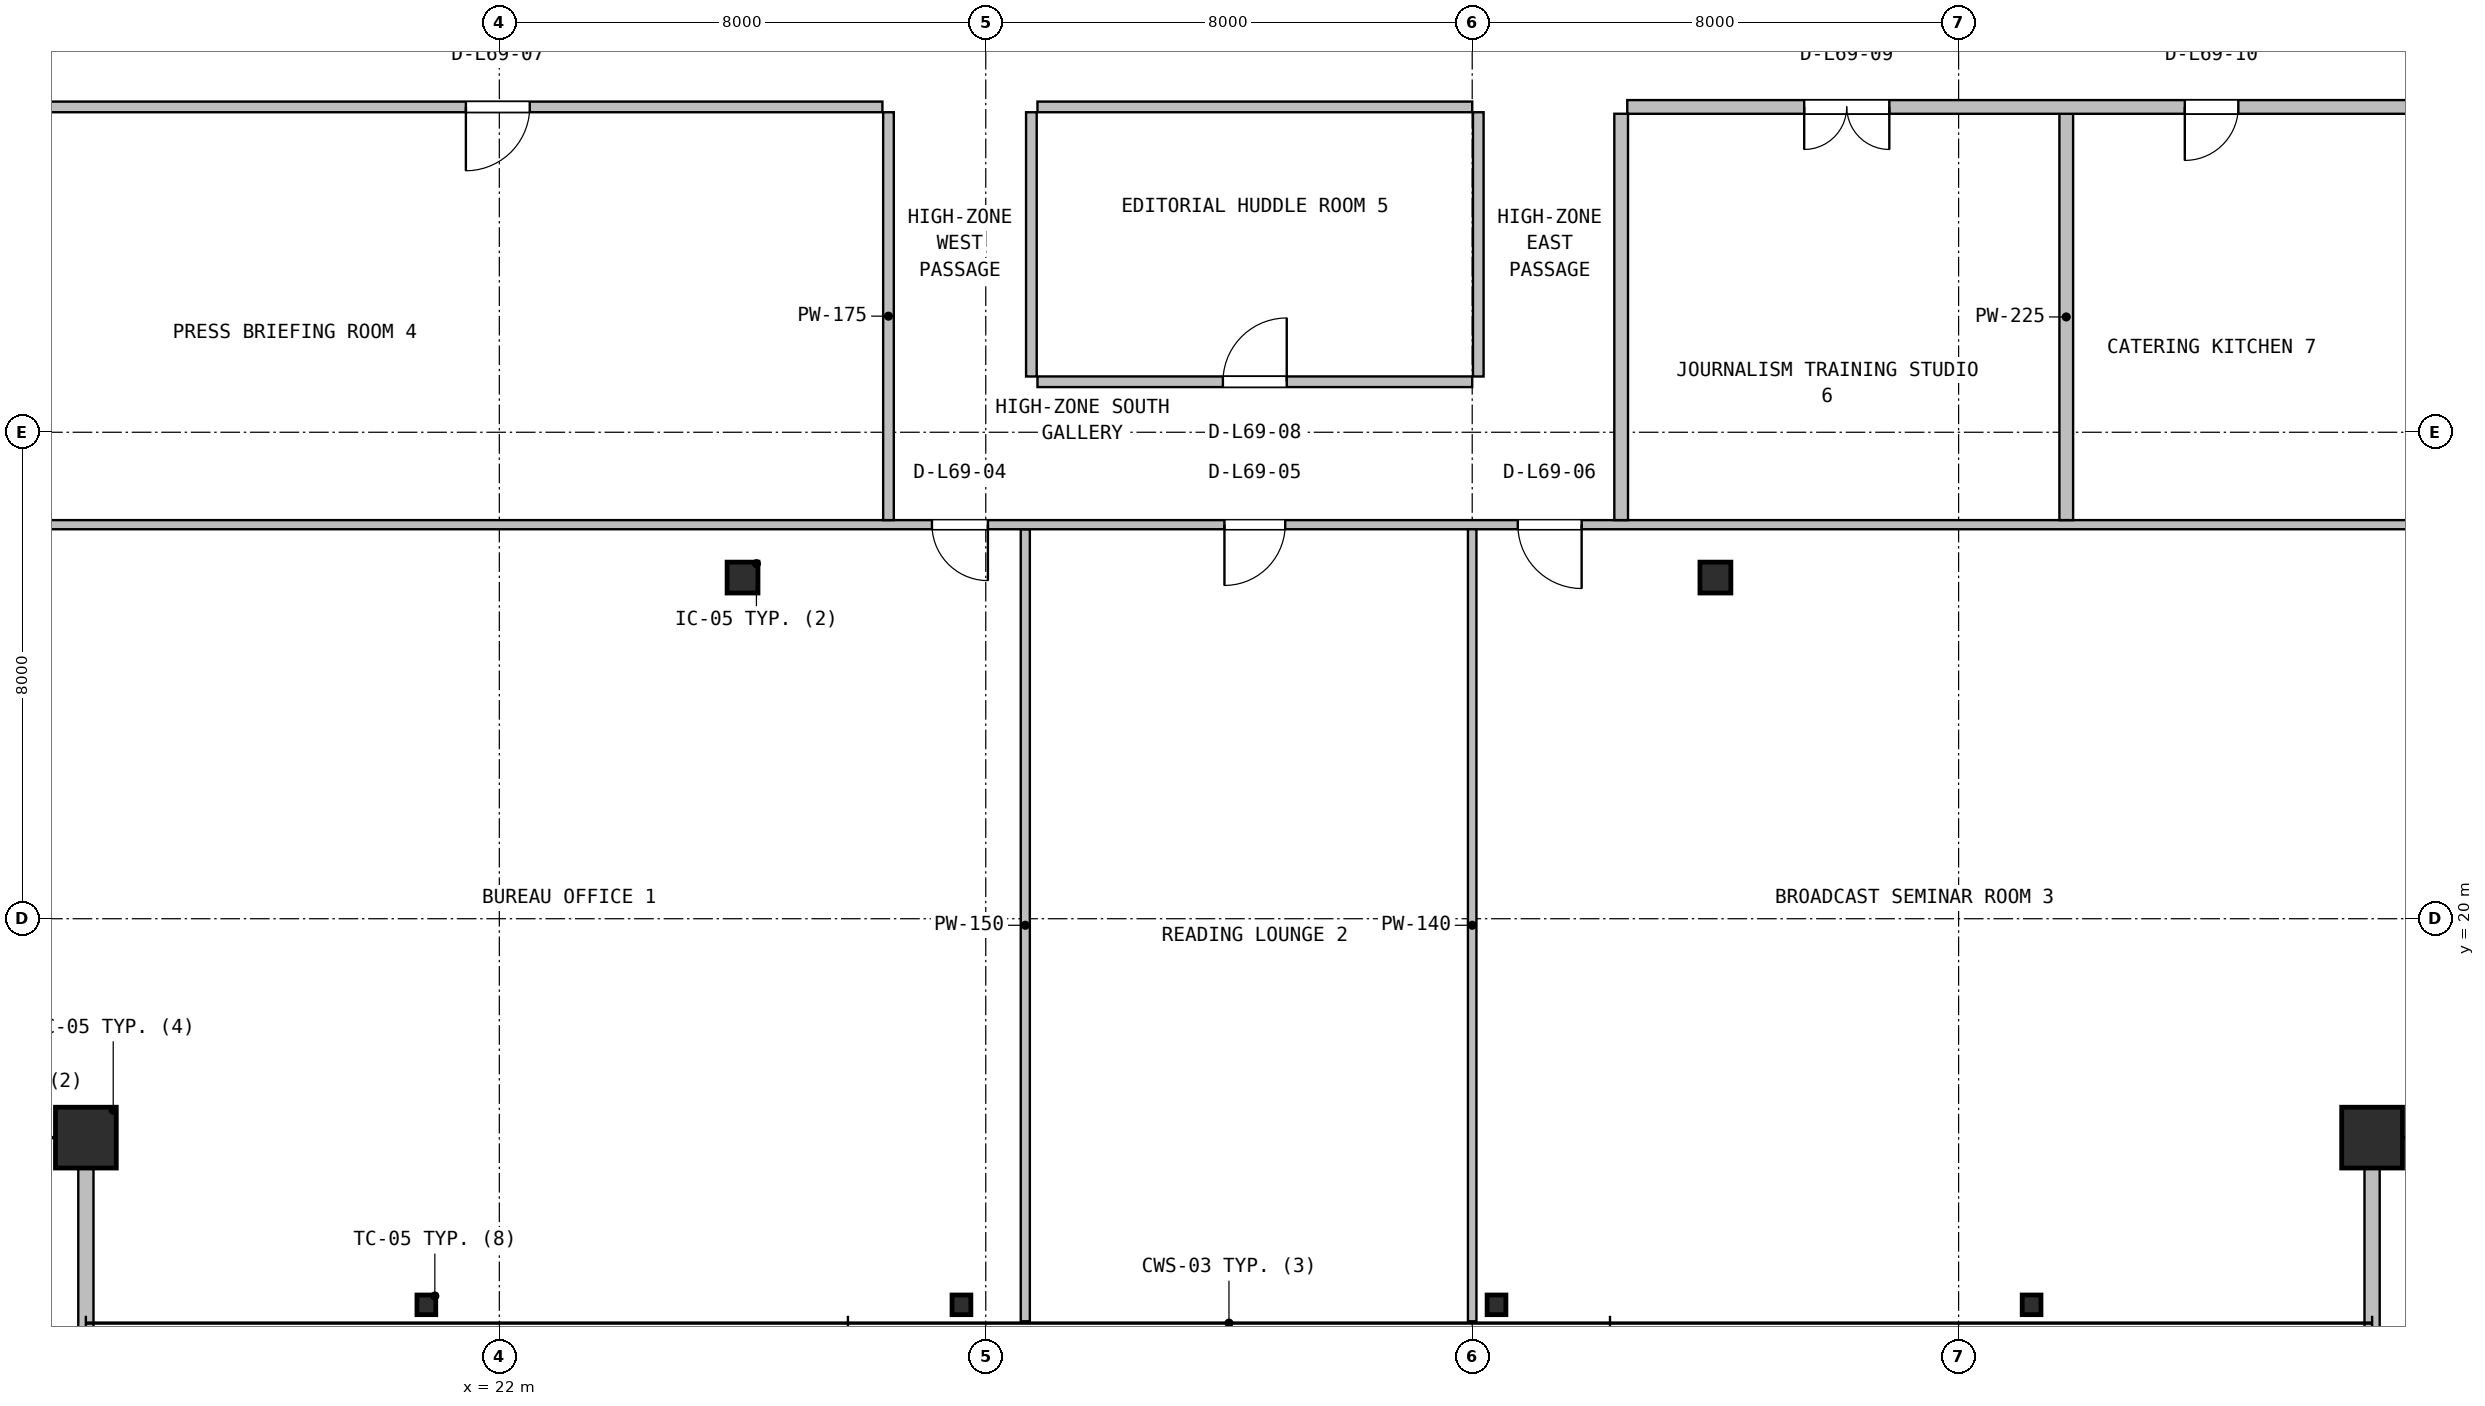
"""IFC4 building model, lengths in metres.
Left out: names, types, materials, properties, quantities, classifications, styles, units other than length and angle.
Written with IfcOpenShell. Run it as: python <this file> out.ifc"""

import sys

from ifc_helpers import new_model, si_unit, direction, frame, frame_2d, origin, origin_2d, place, context, subcontext, project, spatial, rectangle, hollow_rectangle, hollow_circle, i_section, extrude, source, transform, mapped, element, fill, save


model = new_model("IFC4")
c1 = context("Model", 3, precision=1e-05, world=origin(), true_north=direction((0.0, 1.0)))
c2 = subcontext(c1, "Body", "Model", "MODEL_VIEW")
j1 = project(units=[si_unit("LENGTHUNIT", "METRE"), si_unit("PLANEANGLEUNIT", "RADIAN")], contexts=[c1])
p1 = place(None, origin())
s1 = spatial("IfcSite", under=j1, at=p1, CompositionType="ELEMENT")
p2 = place(p1, origin())
s2 = spatial("IfcBuilding", under=s1, at=p2, CompositionType="ELEMENT")
p3 = place(p2, frame((0.0, 0.0, 277.4)))
s3 = spatial("IfcBuildingStorey", under=s2, at=p3, CompositionType="ELEMENT", Elevation=277.4)
m1 = source(origin(), c2, "Body", "SweptSolid", [
    extrude(hollow_rectangle(XDim=1.0, YDim=1.0, WallThickness=0.04, at=origin_2d()), origin(), (0.0, 0.0, 1.0), 3.8),
])
for number, where, z_axis, x_axis in (
    (1, (15.2, 16.4, 0.0), (0.0, 0.0, 1.0), (1.0, 0.0, 0.0)),
    (2, (52.8, 16.4, 0.0), (0.0, 0.0, 1.0), (1.0, 0.0, 0.0)),
):
    element("IfcColumn", number, at=place(p3, frame(where, z_axis=z_axis, x_axis=x_axis)), inside=s3, PredefinedType="COLUMN", context=c2, shape_type="MappedRepresentation", body=[
        mapped(m1, transform((0.0, 0.0, 0.0), x_axis=(1.0, 0.0, 0.0), y_axis=(0.0, 1.0, 0.0), z_axis=(0.0, 0.0, 1.0), scale=1.0)),
    ])
m2 = source(origin(), c2, "Body", "SweptSolid", [
    extrude(i_section(OverallWidth=0.309, OverallDepth=0.323, WebThickness=0.014, FlangeThickness=0.023, FilletRadius=0.015, at=origin_2d()), origin(), (0.0, 0.0, 1.0), 3.8),
])
for number, where, z_axis, x_axis in (
    (3, (20.8, 13.65, 0.0), (0.0, 0.0, 1.0), (1.0, 0.0, 0.0)),
    (4, (29.6, 13.65, 0.0), (0.0, 0.0, 1.0), (1.0, 0.0, 0.0)),
    (5, (38.4, 13.65, 0.0), (0.0, 0.0, 1.0), (1.0, 0.0, 0.0)),
    (6, (47.2, 13.65, 0.0), (0.0, 0.0, 1.0), (1.0, 0.0, 0.0)),
):
    element("IfcColumn", number, at=place(p3, frame(where, z_axis=z_axis, x_axis=x_axis)), inside=s3, PredefinedType="COLUMN", context=c2, shape_type="MappedRepresentation", body=[
        mapped(m2, transform((0.0, 0.0, 0.0), x_axis=(1.0, 0.0, 0.0), y_axis=(0.0, 1.0, 0.0), z_axis=(0.0, 0.0, 1.0), scale=1.0)),
    ])
m3 = source(origin(), c2, "Body", "SweptSolid", [
    extrude(hollow_circle(Radius=0.254, WallThickness=0.02, at=origin_2d()), origin(), (0.0, 0.0, 1.0), 3.8),
])
for number, where, z_axis, x_axis in (
    (7, (26.0, 25.61, 0.0), (0.0, 0.0, 1.0), (1.0, 0.0, 0.0)),
    (8, (42.0, 25.61, 0.0), (0.0, 0.0, 1.0), (1.0, 0.0, 0.0)),
):
    element("IfcColumn", number, at=place(p3, frame(where, z_axis=z_axis, x_axis=x_axis)), inside=s3, PredefinedType="COLUMN", context=c2, shape_type="MappedRepresentation", body=[
        mapped(m3, transform((0.0, 0.0, 0.0), x_axis=(1.0, 0.0, 0.0), y_axis=(0.0, 1.0, 0.0), z_axis=(0.0, 0.0, 1.0), scale=1.0)),
    ])
for number, where, z_axis, x_axis in (
    (9, (15.2, 13.28, 0.0), (0.0, 0.0, 1.0), (0.0, 1.0, 0.0)),
    (10, (52.8, 13.28, 0.0), (0.0, 0.0, 1.0), (0.0, 1.0, 0.0)),
):
    element("IfcWall", number, at=place(p3, frame(where, z_axis=z_axis, x_axis=x_axis)), inside=s3, PredefinedType="SOLIDWALL", context=c2, shape_type="SweptSolid", body=[
        extrude(rectangle(XDim=3.2, YDim=0.25, at=frame_2d((1.6, 0.0))), origin(), (0.0, 0.0, 1.0), 3.171),
    ])
p4 = place(p3, frame((30.65, 13.38, 0.0), z_axis=(0.0, 0.0, 1.0), x_axis=(0.0, 1.0, 0.0)))
e11 = element("IfcWall", 11, at=p4, inside=s3, PredefinedType="PARTITIONING", context=c2, shape_type="SweptSolid", body=[
    extrude(rectangle(XDim=13.025, YDim=0.15, at=frame_2d((6.513, 0.0))), origin(), (0.0, 0.0, 1.0), 2.981),
])
p5 = place(p3, frame((12.18, 26.48, 0.0), z_axis=(0.0, 0.0, 1.0), x_axis=(1.0, 0.0, 0.0)))
e12 = element("IfcWall", 12, at=p5, inside=s3, PredefinedType="PARTITIONING", context=c2, shape_type="SweptSolid", body=[
    extrude(rectangle(XDim=43.64, YDim=0.15, at=frame_2d((21.82, 0.0))), origin(), (0.0, 0.0, 1.0), 2.981),
])
p6 = place(p5, frame((16.935, 0.0, 0.0)))
e13 = element("IfcOpeningElement", 13, at=p6, cuts=e12, PredefinedType="OPENING", context=c2, shape_type="SweptSolid", body=[
    extrude(rectangle(XDim=0.92, YDim=2.08, at=frame_2d((0.46, 1.04))), frame((0.0, 0.085, 0.0), z_axis=(0.0, -1.0, 0.0), x_axis=(1.0, 0.0, 0.0)), (0.0, 0.0, 1.0), 0.17),
])
p7 = place(p5, frame((21.745, 0.0, 0.0)))
e14 = element("IfcOpeningElement", 14, at=p7, cuts=e12, PredefinedType="OPENING", context=c2, shape_type="SweptSolid", body=[
    extrude(rectangle(XDim=1.0, YDim=2.1, at=frame_2d((0.5, 1.05))), frame((0.0, 0.085, 0.0), z_axis=(0.0, -1.0, 0.0), x_axis=(1.0, 0.0, 0.0)), (0.0, 0.0, 1.0), 0.17),
])
p8 = place(p5, frame((26.57, 0.0, 0.0)))
e15 = element("IfcOpeningElement", 15, at=p8, cuts=e12, PredefinedType="OPENING", context=c2, shape_type="SweptSolid", body=[
    extrude(rectangle(XDim=1.05, YDim=2.1, at=frame_2d((0.525, 1.05))), frame((0.0, 0.085, 0.0), z_axis=(0.0, -1.0, 0.0), x_axis=(1.0, 0.0, 0.0)), (0.0, 0.0, 1.0), 0.17),
])
p9 = place(p3, frame((38.0, 13.38, 0.0), z_axis=(0.0, 0.0, 1.0), x_axis=(0.0, 1.0, 0.0)))
e16 = element("IfcWall", 16, at=p9, inside=s3, PredefinedType="PARTITIONING", context=c2, shape_type="SweptSolid", body=[
    extrude(rectangle(XDim=13.025, YDim=0.14, at=frame_2d((6.513, 0.0))), origin(), (0.0, 0.0, 1.0), 2.981),
])
p10 = place(p3, frame((28.4, 26.555, 0.0), z_axis=(0.0, 0.0, 1.0), x_axis=(0.0, 1.0, 0.0)))
e17 = element("IfcWall", 17, at=p10, inside=s3, PredefinedType="PARTITIONING", context=c2, shape_type="SweptSolid", body=[
    extrude(rectangle(XDim=6.708, YDim=0.175, at=frame_2d((3.354, 0.0))), origin(), (0.0, 0.0, 1.0), 3.53),
])
p11 = place(p3, frame((12.18, 33.35, 0.0), z_axis=(0.0, 0.0, 1.0), x_axis=(1.0, 0.0, 0.0)))
e18 = element("IfcWall", 18, at=p11, inside=s3, PredefinedType="PARTITIONING", context=c2, shape_type="SweptSolid", body=[
    extrude(rectangle(XDim=16.12, YDim=0.175, at=frame_2d((8.06, 0.0))), origin(), (0.0, 0.0, 1.0), 2.981),
])
p12 = place(p11, frame((9.27, 0.0, 0.0)))
e19 = element("IfcOpeningElement", 19, at=p12, cuts=e18, PredefinedType="OPENING", context=c2, shape_type="SweptSolid", body=[
    extrude(rectangle(XDim=1.05, YDim=2.1, at=frame_2d((0.525, 1.05))), frame((0.0, 0.098, 0.0), z_axis=(0.0, -1.0, 0.0), x_axis=(1.0, 0.0, 0.0)), (0.0, 0.0, 1.0), 0.195),
])
p13 = place(p3, frame((30.85, 28.83, 0.0), z_axis=(0.0, 0.0, 1.0), x_axis=(1.0, 0.0, 0.0)))
e20 = element("IfcWall", 20, at=p13, inside=s3, PredefinedType="PARTITIONING", context=c2, shape_type="SweptSolid", body=[
    extrude(rectangle(XDim=7.15, YDim=0.175, at=frame_2d((3.575, 0.0))), origin(), (0.0, 0.0, 1.0), 2.981),
])
p14 = place(p13, frame((3.05, 0.0, 0.0)))
e21 = element("IfcOpeningElement", 21, at=p14, cuts=e20, PredefinedType="OPENING", context=c2, shape_type="SweptSolid", body=[
    extrude(rectangle(XDim=1.05, YDim=2.1, at=frame_2d((0.525, 1.05))), frame((0.0, 0.098, 0.0), z_axis=(0.0, -1.0, 0.0), x_axis=(1.0, 0.0, 0.0)), (0.0, 0.0, 1.0), 0.195),
])
p15 = place(p3, frame((38.1, 28.917, 0.0), z_axis=(0.0, 0.0, 1.0), x_axis=(0.0, 1.0, 0.0)))
e22 = element("IfcWall", 22, at=p15, inside=s3, PredefinedType="PARTITIONING", context=c2, shape_type="SweptSolid", body=[
    extrude(rectangle(XDim=4.346, YDim=0.175, at=frame_2d((2.173, 0.0))), origin(), (0.0, 0.0, 1.0), 3.53),
])
p16 = place(p3, frame((30.85, 33.35, 0.0), z_axis=(0.0, 0.0, 1.0), x_axis=(1.0, 0.0, 0.0)))
e23 = element("IfcWall", 23, at=p16, inside=s3, PredefinedType="PARTITIONING", context=c2, shape_type="SweptSolid", body=[
    extrude(rectangle(XDim=7.15, YDim=0.175, at=frame_2d((3.575, 0.0))), origin(), (0.0, 0.0, 1.0), 2.981),
])
p17 = place(p3, frame((30.75, 28.917, 0.0), z_axis=(0.0, 0.0, 1.0), x_axis=(0.0, 1.0, 0.0)))
e24 = element("IfcWall", 24, at=p17, inside=s3, PredefinedType="PARTITIONING", context=c2, shape_type="SweptSolid", body=[
    extrude(rectangle(XDim=4.346, YDim=0.175, at=frame_2d((2.173, 0.0))), origin(), (0.0, 0.0, 1.0), 3.53),
])
p18 = place(p3, frame((47.77, 26.555, 0.0), z_axis=(0.0, 0.0, 1.0), x_axis=(0.0, 1.0, 0.0)))
e25 = element("IfcWall", 25, at=p18, inside=s3, PredefinedType="PARTITIONING", context=c2, shape_type="SweptSolid", body=[
    extrude(rectangle(XDim=6.683, YDim=0.225, at=frame_2d((3.342, 0.0))), origin(), (0.0, 0.0, 1.0), 3.53),
])
p19 = place(p3, frame((40.55, 33.35, 0.0), z_axis=(0.0, 0.0, 1.0), x_axis=(1.0, 0.0, 0.0)))
e26 = element("IfcWall", 26, at=p19, inside=s3, PredefinedType="PARTITIONING", context=c2, shape_type="SweptSolid", body=[
    extrude(rectangle(XDim=15.27, YDim=0.225, at=frame_2d((7.635, 0.0))), origin(), (0.0, 0.0, 1.0), 2.981),
])
p20 = place(p19, frame((2.91, 0.0, 0.0)))
e27 = element("IfcOpeningElement", 27, at=p20, cuts=e26, PredefinedType="OPENING", context=c2, shape_type="SweptSolid", body=[
    extrude(rectangle(XDim=1.4, YDim=2.12, at=frame_2d((0.7, 1.06))), frame((0.0, 0.123, 0.0), z_axis=(0.0, -1.0, 0.0), x_axis=(1.0, 0.0, 0.0)), (0.0, 0.0, 1.0), 0.245),
])
p21 = place(p19, frame((9.17, 0.0, 0.0)))
e28 = element("IfcOpeningElement", 28, at=p21, cuts=e26, PredefinedType="OPENING", context=c2, shape_type="SweptSolid", body=[
    extrude(rectangle(XDim=0.88, YDim=2.06, at=frame_2d((0.44, 1.03))), frame((0.0, 0.123, 0.0), z_axis=(0.0, -1.0, 0.0), x_axis=(1.0, 0.0, 0.0)), (0.0, 0.0, 1.0), 0.245),
])
p22 = place(p3, frame((40.45, 26.555, 0.0), z_axis=(0.0, 0.0, 1.0), x_axis=(0.0, 1.0, 0.0)))
e29 = element("IfcWall", 29, at=p22, inside=s3, PredefinedType="PARTITIONING", context=c2, shape_type="SweptSolid", body=[
    extrude(rectangle(XDim=6.683, YDim=0.225, at=frame_2d((3.342, 0.0))), origin(), (0.0, 0.0, 1.0), 3.53),
])
m4 = source(origin(), c2, "Body", "SweptSolid", [
    extrude(rectangle(XDim=0.92, YDim=2.08, at=frame_2d((0.46, 1.04))), frame((0.0, 0.025, 0.0), z_axis=(0.0, -1.0, 0.0), x_axis=(1.0, 0.0, 0.0)), (0.0, 0.0, 1.0), 0.05),
])
p23 = place(p6, frame((0.92, 0.0, 0.0), z_axis=(0.0, 0.0, 1.0), x_axis=(-1.0, 0.0, 0.0)))
e30 = element("IfcDoor", 30, at=p23, inside=s3, OperationType="SINGLE_SWING_RIGHT", PredefinedType="DOOR", context=c2, shape_type="MappedRepresentation", body=[
    mapped(m4, transform((0.0, 0.0, 0.0), x_axis=(1.0, 0.0, 0.0), y_axis=(0.0, 1.0, 0.0), z_axis=(0.0, 0.0, 1.0), scale=1.0)),
])
fill(e13, e30)
m5 = source(origin(), c2, "Body", "SweptSolid", [
    extrude(rectangle(XDim=1.0, YDim=2.1, at=frame_2d((0.5, 1.05))), frame((0.0, 0.025, 0.0), z_axis=(0.0, -1.0, 0.0), x_axis=(1.0, 0.0, 0.0)), (0.0, 0.0, 1.0), 0.05),
])
p24 = place(p7, frame((1.0, 0.0, 0.0), z_axis=(0.0, 0.0, 1.0), x_axis=(-1.0, 0.0, 0.0)))
e31 = element("IfcDoor", 31, at=p24, inside=s3, OperationType="SINGLE_SWING_LEFT", PredefinedType="DOOR", context=c2, shape_type="MappedRepresentation", body=[
    mapped(m5, transform((0.0, 0.0, 0.0), x_axis=(1.0, 0.0, 0.0), y_axis=(0.0, 1.0, 0.0), z_axis=(0.0, 0.0, 1.0), scale=1.0)),
])
fill(e14, e31)
m6 = source(origin(), c2, "Body", "SweptSolid", [
    extrude(rectangle(XDim=1.05, YDim=2.1, at=frame_2d((0.525, 1.05))), frame((0.0, 0.025, 0.0), z_axis=(0.0, -1.0, 0.0), x_axis=(1.0, 0.0, 0.0)), (0.0, 0.0, 1.0), 0.05),
])
p25 = place(p8, frame((1.05, 0.0, 0.0), z_axis=(0.0, 0.0, 1.0), x_axis=(-1.0, 0.0, 0.0)))
e32 = element("IfcDoor", 32, at=p25, inside=s3, OperationType="SINGLE_SWING_RIGHT", PredefinedType="DOOR", context=c2, shape_type="MappedRepresentation", body=[
    mapped(m6, transform((0.0, 0.0, 0.0), x_axis=(1.0, 0.0, 0.0), y_axis=(0.0, 1.0, 0.0), z_axis=(0.0, 0.0, 1.0), scale=1.0)),
])
fill(e15, e32)
p26 = place(p12, frame((1.05, 0.0, 0.0), z_axis=(0.0, 0.0, 1.0), x_axis=(-1.0, 0.0, 0.0)))
e33 = element("IfcDoor", 33, at=p26, inside=s3, OperationType="SINGLE_SWING_LEFT", PredefinedType="DOOR", context=c2, shape_type="MappedRepresentation", body=[
    mapped(m6, transform((0.0, 0.0, 0.0), x_axis=(1.0, 0.0, 0.0), y_axis=(0.0, 1.0, 0.0), z_axis=(0.0, 0.0, 1.0), scale=1.0)),
])
fill(e19, e33)
p27 = place(p14, origin())
e34 = element("IfcDoor", 34, at=p27, inside=s3, OperationType="SINGLE_SWING_RIGHT", PredefinedType="DOOR", context=c2, shape_type="MappedRepresentation", body=[
    mapped(m6, transform((0.0, 0.0, 0.0), x_axis=(1.0, 0.0, 0.0), y_axis=(0.0, 1.0, 0.0), z_axis=(0.0, 0.0, 1.0), scale=1.0)),
])
fill(e21, e34)
m7 = source(origin(), c2, "Body", "SweptSolid", [
    extrude(rectangle(XDim=1.4, YDim=2.12, at=frame_2d((0.7, 1.06))), frame((0.0, 0.025, 0.0), z_axis=(0.0, -1.0, 0.0), x_axis=(1.0, 0.0, 0.0)), (0.0, 0.0, 1.0), 0.05),
])
p28 = place(p20, frame((1.4, 0.0, 0.0), z_axis=(0.0, 0.0, 1.0), x_axis=(-1.0, 0.0, 0.0)))
e35 = element("IfcDoor", 35, at=p28, inside=s3, OperationType="DOUBLE_DOOR_SINGLE_SWING", PredefinedType="DOOR", context=c2, shape_type="MappedRepresentation", body=[
    mapped(m7, transform((0.0, 0.0, 0.0), x_axis=(1.0, 0.0, 0.0), y_axis=(0.0, 1.0, 0.0), z_axis=(0.0, 0.0, 1.0), scale=1.0)),
])
fill(e27, e35)
m8 = source(origin(), c2, "Body", "SweptSolid", [
    extrude(rectangle(XDim=0.88, YDim=2.06, at=frame_2d((0.44, 1.03))), frame((0.0, 0.025, 0.0), z_axis=(0.0, -1.0, 0.0), x_axis=(1.0, 0.0, 0.0)), (0.0, 0.0, 1.0), 0.05),
])
p29 = place(p21, frame((0.88, 0.0, 0.0), z_axis=(0.0, 0.0, 1.0), x_axis=(-1.0, 0.0, 0.0)))
e36 = element("IfcDoor", 36, at=p29, inside=s3, OperationType="SINGLE_SWING_LEFT", PredefinedType="DOOR", context=c2, shape_type="MappedRepresentation", body=[
    mapped(m8, transform((0.0, 0.0, 0.0), x_axis=(1.0, 0.0, 0.0), y_axis=(0.0, 1.0, 0.0), z_axis=(0.0, 0.0, 1.0), scale=1.0)),
])
fill(e28, e36)
save(model, sys.argv[1])
